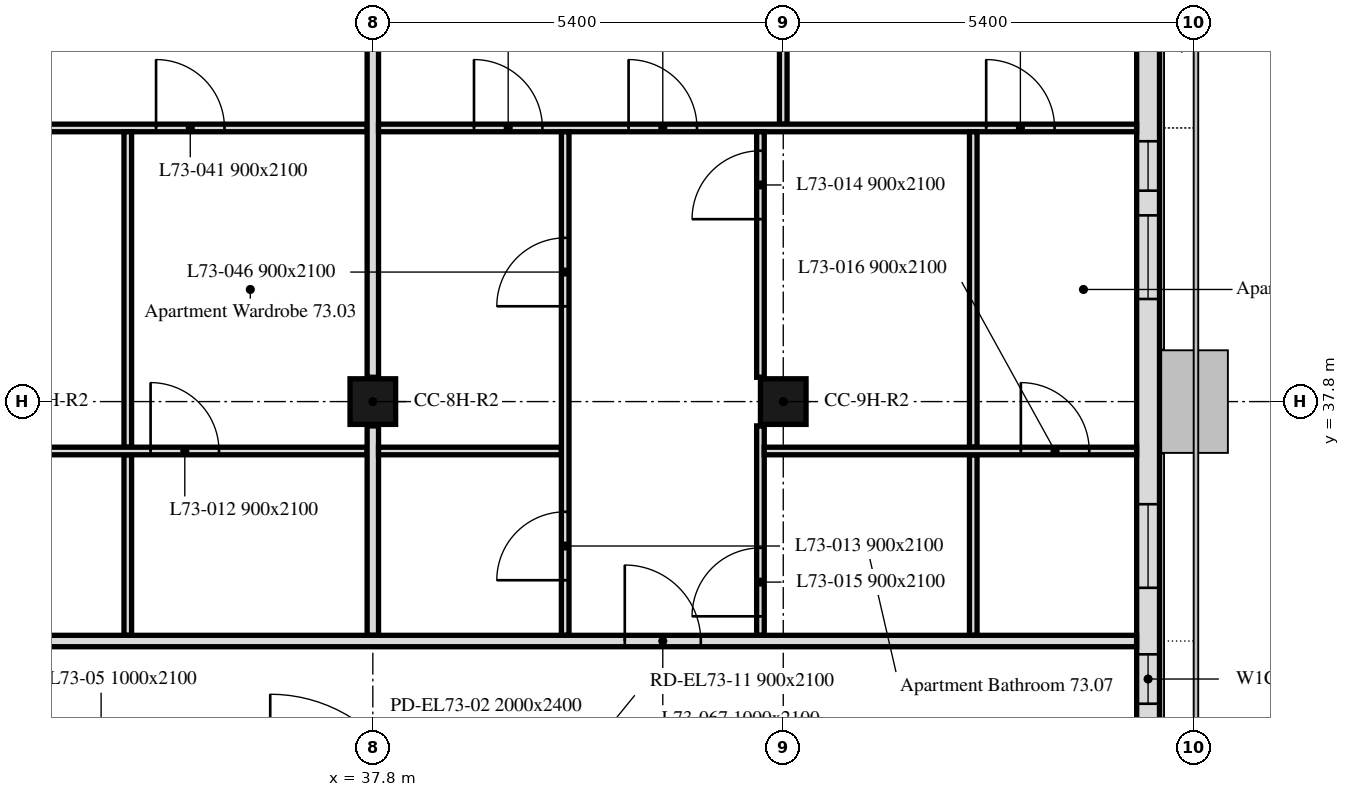
"""IFC4 building model, lengths in metres.
Left out: names, types, materials, properties, quantities, classifications, styles, units other than length and angle.
Written with IfcOpenShell. Run it as: python <this file> out.ifc"""

import sys

from ifc_helpers import new_model, si_unit, direction, frame, frame_2d, origin, origin_2d, place, context, subcontext, project, spatial, rectangle, extrude, element, fill, save


model = new_model("IFC4")
c1 = context("Model", 3, precision=1e-05, world=origin(), true_north=direction((0.0, 1.0)))
c2 = subcontext(c1, "Body", "Model", "MODEL_VIEW")
j1 = project(units=[si_unit("LENGTHUNIT", "METRE"), si_unit("PLANEANGLEUNIT", "RADIAN")], contexts=[c1])
p1 = place(None, origin())
s1 = spatial("IfcSite", under=j1, at=p1, CompositionType="ELEMENT")
p2 = place(p1, origin())
s2 = spatial("IfcBuilding", under=s1, at=p2, CompositionType="ELEMENT")
p3 = place(p2, frame((0.0, 0.0, 295.0)))
s3 = spatial("IfcBuildingStorey", under=s2, at=p3, CompositionType="ELEMENT", Elevation=295.0)
for number, where, z_axis, x_axis in (
    (1, (37.8, 37.8, 0.0), (0.0, 0.0, 1.0), (1.0, 0.0, 0.0)),
    (2, (43.2, 37.8, 0.0), (0.0, 0.0, 1.0), (1.0, 0.0, 0.0)),
):
    element("IfcColumn", number, at=place(p3, frame(where, z_axis=z_axis, x_axis=x_axis)), inside=s3, PredefinedType="COLUMN", context=c2, shape_type="SweptSolid", body=[
        extrude(rectangle(XDim=0.6, YDim=0.6, at=origin_2d()), origin(), (0.0, 0.0, 1.0), 3.0),
    ])
p4 = place(p3, frame((48.0, 10.986, 0.0), z_axis=(0.0, 0.0, 1.0), x_axis=(0.0, 1.0, 0.0)))
e3 = element("IfcWall", 3, at=p4, inside=s3, PredefinedType="SOLIDWALL", context=c2, shape_type="SweptSolid", body=[
    extrude(rectangle(XDim=32.027, YDim=0.3, at=frame_2d((16.014, 0.0))), origin(), (0.0, 0.0, 1.0), 3.0),
])
p5 = place(p4, frame((1.164, 0.0, 0.9)))
e4 = element("IfcOpeningElement", 4, at=p5, cuts=e3, PredefinedType="OPENING", context=c2, shape_type="SweptSolid", body=[
    extrude(rectangle(XDim=1.1, YDim=1.7, at=frame_2d((0.55, 0.85))), frame((0.0, 0.16, 0.0), z_axis=(0.0, -1.0, 0.0), x_axis=(1.0, 0.0, 0.0)), (0.0, 0.0, 1.0), 0.32),
])
p6 = place(p4, frame((3.114, 0.0, 0.9)))
e5 = element("IfcOpeningElement", 5, at=p6, cuts=e3, PredefinedType="OPENING", context=c2, shape_type="SweptSolid", body=[
    extrude(rectangle(XDim=1.1, YDim=1.7, at=frame_2d((0.55, 0.85))), frame((0.0, 0.16, 0.0), z_axis=(0.0, -1.0, 0.0), x_axis=(1.0, 0.0, 0.0)), (0.0, 0.0, 1.0), 0.32),
])
p7 = place(p4, frame((6.564, 0.0, 0.9)))
e6 = element("IfcOpeningElement", 6, at=p7, cuts=e3, PredefinedType="OPENING", context=c2, shape_type="SweptSolid", body=[
    extrude(rectangle(XDim=1.1, YDim=1.7, at=frame_2d((0.55, 0.85))), frame((0.0, 0.16, 0.0), z_axis=(0.0, -1.0, 0.0), x_axis=(1.0, 0.0, 0.0)), (0.0, 0.0, 1.0), 0.32),
])
p8 = place(p4, frame((8.164, 0.0, 0.9)))
e7 = element("IfcOpeningElement", 7, at=p8, cuts=e3, PredefinedType="OPENING", context=c2, shape_type="SweptSolid", body=[
    extrude(rectangle(XDim=1.1, YDim=1.7, at=frame_2d((0.55, 0.85))), frame((0.0, 0.16, 0.0), z_axis=(0.0, -1.0, 0.0), x_axis=(1.0, 0.0, 0.0)), (0.0, 0.0, 1.0), 0.32),
])
p9 = place(p4, frame((11.614, 0.0, 0.9)))
e8 = element("IfcOpeningElement", 8, at=p9, cuts=e3, PredefinedType="OPENING", context=c2, shape_type="SweptSolid", body=[
    extrude(rectangle(XDim=3.4, YDim=1.7, at=frame_2d((1.7, 0.85))), frame((0.0, 0.16, 0.0), z_axis=(0.0, -1.0, 0.0), x_axis=(1.0, 0.0, 0.0)), (0.0, 0.0, 1.0), 0.32),
])
p10 = place(p4, frame((17.364, 0.0, 0.9)))
e9 = element("IfcOpeningElement", 9, at=p10, cuts=e3, PredefinedType="OPENING", context=c2, shape_type="SweptSolid", body=[
    extrude(rectangle(XDim=1.1, YDim=1.7, at=frame_2d((0.55, 0.85))), frame((0.0, 0.16, 0.0), z_axis=(0.0, -1.0, 0.0), x_axis=(1.0, 0.0, 0.0)), (0.0, 0.0, 1.0), 0.32),
])
p11 = place(p4, frame((18.964, 0.0, 0.9)))
e10 = element("IfcOpeningElement", 10, at=p11, cuts=e3, PredefinedType="OPENING", context=c2, shape_type="SweptSolid", body=[
    extrude(rectangle(XDim=1.1, YDim=1.7, at=frame_2d((0.55, 0.85))), frame((0.0, 0.16, 0.0), z_axis=(0.0, -1.0, 0.0), x_axis=(1.0, 0.0, 0.0)), (0.0, 0.0, 1.0), 0.32),
])
p12 = place(p4, frame((22.839, 0.0, 0.9)))
e11 = element("IfcOpeningElement", 11, at=p12, cuts=e3, PredefinedType="OPENING", context=c2, shape_type="SweptSolid", body=[
    extrude(rectangle(XDim=0.65, YDim=1.7, at=frame_2d((0.325, 0.85))), frame((0.0, 0.16, 0.0), z_axis=(0.0, -1.0, 0.0), x_axis=(1.0, 0.0, 0.0)), (0.0, 0.0, 1.0), 0.32),
])
p13 = place(p4, frame((24.364, 0.0, 0.9)))
e12 = element("IfcOpeningElement", 12, at=p13, cuts=e3, PredefinedType="OPENING", context=c2, shape_type="SweptSolid", body=[
    extrude(rectangle(XDim=1.1, YDim=1.7, at=frame_2d((0.55, 0.85))), frame((0.0, 0.16, 0.0), z_axis=(0.0, -1.0, 0.0), x_axis=(1.0, 0.0, 0.0)), (0.0, 0.0, 1.0), 0.32),
])
p14 = place(p4, frame((28.164, 0.0, 0.9)))
e13 = element("IfcOpeningElement", 13, at=p14, cuts=e3, PredefinedType="OPENING", context=c2, shape_type="SweptSolid", body=[
    extrude(rectangle(XDim=1.1, YDim=1.7, at=frame_2d((0.55, 0.85))), frame((0.0, 0.16, 0.0), z_axis=(0.0, -1.0, 0.0), x_axis=(1.0, 0.0, 0.0)), (0.0, 0.0, 1.0), 0.32),
])
p15 = place(p4, frame((29.589, 0.0, 0.9)))
e14 = element("IfcOpeningElement", 14, at=p15, cuts=e3, PredefinedType="OPENING", context=c2, shape_type="SweptSolid", body=[
    extrude(rectangle(XDim=0.65, YDim=1.7, at=frame_2d((0.325, 0.85))), frame((0.0, 0.16, 0.0), z_axis=(0.0, -1.0, 0.0), x_axis=(1.0, 0.0, 0.0)), (0.0, 0.0, 1.0), 0.32),
])
p16 = place(p3, frame((32.37, 41.4, 0.0), z_axis=(0.0, 0.0, 1.0), x_axis=(1.0, 0.0, 0.0)))
e15 = element("IfcWall", 15, at=p16, inside=s3, PredefinedType="PARTITIONING", context=c2, shape_type="SweptSolid", body=[
    extrude(rectangle(XDim=5.355, YDim=0.1, at=frame_2d((2.677, 0.0))), origin(), (0.0, 0.0, 1.0), 3.0),
])
p17 = place(p16, frame((2.578, 0.0, 0.0)))
e16 = element("IfcOpeningElement", 16, at=p17, cuts=e15, PredefinedType="OPENING", context=c2, shape_type="SweptSolid", body=[
    extrude(rectangle(XDim=0.9, YDim=2.1, at=frame_2d((0.45, 1.05))), frame((0.0, 0.05, 0.0), z_axis=(0.0, -1.0, 0.0), x_axis=(1.0, 0.0, 0.0)), (0.0, 0.0, 1.0), 0.1),
])
p18 = place(p3, frame((34.576, 37.2, 0.0), z_axis=(0.0, 0.0, 1.0), x_axis=(0.0, 1.0, 0.0)))
e17 = element("IfcWall", 17, at=p18, inside=s3, PredefinedType="PARTITIONING", context=c2, shape_type="SweptSolid", body=[
    extrude(rectangle(XDim=4.15, YDim=0.1, at=frame_2d((2.075, 0.0))), origin(), (0.0, 0.0, 1.0), 2.4),
])
p19 = place(p3, frame((34.576, 34.725, 0.0), z_axis=(0.0, 0.0, 1.0), x_axis=(0.0, 1.0, 0.0)))
e18 = element("IfcWall", 18, at=p19, inside=s3, PredefinedType="PARTITIONING", context=c2, shape_type="SweptSolid", body=[
    extrude(rectangle(XDim=2.375, YDim=0.1, at=frame_2d((1.188, 0.0))), origin(), (0.0, 0.0, 1.0), 3.0),
])
p20 = place(p3, frame((32.47, 37.15, 0.0), z_axis=(0.0, 0.0, 1.0), x_axis=(1.0, 0.0, 0.0)))
e19 = element("IfcWall", 19, at=p20, inside=s3, PredefinedType="PARTITIONING", context=c2, shape_type="SweptSolid", body=[
    extrude(rectangle(XDim=5.255, YDim=0.1, at=frame_2d((2.627, 0.0))), origin(), (0.0, 0.0, 1.0), 3.0),
])
p21 = place(p20, frame((2.406, 0.0, 0.0)))
e20 = element("IfcOpeningElement", 20, at=p21, cuts=e19, PredefinedType="OPENING", context=c2, shape_type="SweptSolid", body=[
    extrude(rectangle(XDim=0.9, YDim=2.1, at=frame_2d((0.45, 1.05))), frame((0.0, 0.05, 0.0), z_axis=(0.0, -1.0, 0.0), x_axis=(1.0, 0.0, 0.0)), (0.0, 0.0, 1.0), 0.1),
])
p22 = place(p3, frame((37.8, 38.12, 0.0), z_axis=(0.0, 0.0, 1.0), x_axis=(0.0, 1.0, 0.0)))
e21 = element("IfcWall", 21, at=p22, inside=s3, PredefinedType="PARTITIONING", context=c2, shape_type="SweptSolid", body=[
    extrude(rectangle(XDim=4.76, YDim=0.15, at=frame_2d((2.38, 0.0))), origin(), (0.0, 0.0, 1.0), 2.4),
])
p23 = place(p3, frame((37.8, 34.725, 0.0), z_axis=(0.0, 0.0, 1.0), x_axis=(0.0, 1.0, 0.0)))
e22 = element("IfcWall", 22, at=p23, inside=s3, PredefinedType="PARTITIONING", context=c2, shape_type="SweptSolid", body=[
    extrude(rectangle(XDim=2.755, YDim=0.15, at=frame_2d((1.377, 0.0))), origin(), (0.0, 0.0, 1.0), 2.4),
])
p24 = place(p3, frame((43.2, 41.45, 0.0), z_axis=(0.0, 0.0, 1.0), x_axis=(0.0, 1.0, 0.0)))
e23 = element("IfcWall", 23, at=p24, inside=s3, PredefinedType="PARTITIONING", context=c2, shape_type="SweptSolid", body=[
    extrude(rectangle(XDim=6.038, YDim=0.1, at=frame_2d((3.019, 0.0))), origin(), (0.0, 0.0, 1.0), 3.0),
])
p25 = place(p24, frame((3.1, 0.0, 0.0)))
e24 = element("IfcOpeningElement", 24, at=p25, cuts=e23, PredefinedType="OPENING", context=c2, shape_type="SweptSolid", body=[
    extrude(rectangle(XDim=0.9, YDim=2.1, at=frame_2d((0.45, 1.05))), frame((0.0, 0.05, 0.0), z_axis=(0.0, -1.0, 0.0), x_axis=(1.0, 0.0, 0.0)), (0.0, 0.0, 1.0), 0.1),
])
p26 = place(p3, frame((37.875, 41.4, 0.0), z_axis=(0.0, 0.0, 1.0), x_axis=(1.0, 0.0, 0.0)))
e25 = element("IfcWall", 25, at=p26, inside=s3, PredefinedType="PARTITIONING", context=c2, shape_type="SweptSolid", body=[
    extrude(rectangle(XDim=9.974, YDim=0.1, at=frame_2d((4.987, 0.0))), origin(), (0.0, 0.0, 1.0), 3.0),
])
p27 = place(p26, frame((1.256, 0.0, 0.0)))
e26 = element("IfcOpeningElement", 26, at=p27, cuts=e25, PredefinedType="OPENING", context=c2, shape_type="SweptSolid", body=[
    extrude(rectangle(XDim=0.9, YDim=2.1, at=frame_2d((0.45, 1.05))), frame((0.0, 0.05, 0.0), z_axis=(0.0, -1.0, 0.0), x_axis=(1.0, 0.0, 0.0)), (0.0, 0.0, 1.0), 0.1),
])
p28 = place(p26, frame((7.995, 0.0, 0.0)))
e27 = element("IfcOpeningElement", 27, at=p28, cuts=e25, PredefinedType="OPENING", context=c2, shape_type="SweptSolid", body=[
    extrude(rectangle(XDim=0.9, YDim=2.1, at=frame_2d((0.45, 1.05))), frame((0.0, 0.05, 0.0), z_axis=(0.0, -1.0, 0.0), x_axis=(1.0, 0.0, 0.0)), (0.0, 0.0, 1.0), 0.1),
])
p29 = place(p26, frame((3.29, 0.0, 0.0)))
e28 = element("IfcOpeningElement", 28, at=p29, cuts=e25, PredefinedType="OPENING", context=c2, shape_type="SweptSolid", body=[
    extrude(rectangle(XDim=0.9, YDim=2.1, at=frame_2d((0.45, 1.05))), frame((0.0, 0.05, 0.0), z_axis=(0.0, -1.0, 0.0), x_axis=(1.0, 0.0, 0.0)), (0.0, 0.0, 1.0), 0.1),
])
p30 = place(p3, frame((37.875, 37.15, 0.0), z_axis=(0.0, 0.0, 1.0), x_axis=(1.0, 0.0, 0.0)))
e29 = element("IfcWall", 29, at=p30, inside=s3, PredefinedType="PARTITIONING", context=c2, shape_type="SweptSolid", body=[
    extrude(rectangle(XDim=2.406, YDim=0.1, at=frame_2d((1.203, 0.0))), origin(), (0.0, 0.0, 1.0), 3.0),
])
p31 = place(p3, frame((40.331, 34.725, 0.0), z_axis=(0.0, 0.0, 1.0), x_axis=(0.0, 1.0, 0.0)))
e30 = element("IfcWall", 30, at=p31, inside=s3, PredefinedType="PARTITIONING", context=c2, shape_type="SweptSolid", body=[
    extrude(rectangle(XDim=6.625, YDim=0.1, at=frame_2d((3.312, 0.0))), origin(), (0.0, 0.0, 1.0), 2.4),
])
p32 = place(p31, frame((0.725, 0.0, 0.0)))
e31 = element("IfcOpeningElement", 31, at=p32, cuts=e30, PredefinedType="OPENING", context=c2, shape_type="SweptSolid", body=[
    extrude(rectangle(XDim=0.9, YDim=2.1, at=frame_2d((0.45, 1.05))), frame((0.0, 0.05, 0.0), z_axis=(0.0, -1.0, 0.0), x_axis=(1.0, 0.0, 0.0)), (0.0, 0.0, 1.0), 0.1),
])
p33 = place(p31, frame((4.329, 0.0, 0.0)))
e32 = element("IfcOpeningElement", 32, at=p33, cuts=e30, PredefinedType="OPENING", context=c2, shape_type="SweptSolid", body=[
    extrude(rectangle(XDim=0.9, YDim=2.1, at=frame_2d((0.45, 1.05))), frame((0.0, 0.05, 0.0), z_axis=(0.0, -1.0, 0.0), x_axis=(1.0, 0.0, 0.0)), (0.0, 0.0, 1.0), 0.1),
])
p34 = place(p3, frame((42.9, 34.725, 0.0), z_axis=(0.0, 0.0, 1.0), x_axis=(0.0, 1.0, 0.0)))
e33 = element("IfcWall", 33, at=p34, inside=s3, PredefinedType="PARTITIONING", context=c2, shape_type="SweptSolid", body=[
    extrude(rectangle(XDim=2.755, YDim=0.1, at=frame_2d((1.377, 0.0))), origin(), (0.0, 0.0, 1.0), 3.0),
])
p35 = place(p34, frame((0.25, 0.0, 0.0)))
e34 = element("IfcOpeningElement", 34, at=p35, cuts=e33, PredefinedType="OPENING", context=c2, shape_type="SweptSolid", body=[
    extrude(rectangle(XDim=0.9, YDim=2.1, at=frame_2d((0.45, 1.05))), frame((0.0, 0.05, 0.0), z_axis=(0.0, -1.0, 0.0), x_axis=(1.0, 0.0, 0.0)), (0.0, 0.0, 1.0), 0.1),
])
p36 = place(p3, frame((42.9, 38.12, 0.0), z_axis=(0.0, 0.0, 1.0), x_axis=(0.0, 1.0, 0.0)))
e35 = element("IfcWall", 35, at=p36, inside=s3, PredefinedType="PARTITIONING", context=c2, shape_type="SweptSolid", body=[
    extrude(rectangle(XDim=3.23, YDim=0.1, at=frame_2d((1.615, 0.0))), origin(), (0.0, 0.0, 1.0), 3.0),
])
p37 = place(p36, frame((2.08, 0.0, 0.0)))
e36 = element("IfcOpeningElement", 36, at=p37, cuts=e35, PredefinedType="OPENING", context=c2, shape_type="SweptSolid", body=[
    extrude(rectangle(XDim=0.9, YDim=2.1, at=frame_2d((0.45, 1.05))), frame((0.0, 0.05, 0.0), z_axis=(0.0, -1.0, 0.0), x_axis=(1.0, 0.0, 0.0)), (0.0, 0.0, 1.0), 0.1),
])
p38 = place(p3, frame((45.7, 37.2, 0.0), z_axis=(0.0, 0.0, 1.0), x_axis=(0.0, 1.0, 0.0)))
e37 = element("IfcWall", 37, at=p38, inside=s3, PredefinedType="PARTITIONING", context=c2, shape_type="SweptSolid", body=[
    extrude(rectangle(XDim=4.15, YDim=0.1, at=frame_2d((2.075, 0.0))), origin(), (0.0, 0.0, 1.0), 2.4),
])
p39 = place(p3, frame((45.7, 34.725, 0.0), z_axis=(0.0, 0.0, 1.0), x_axis=(0.0, 1.0, 0.0)))
e38 = element("IfcWall", 38, at=p39, inside=s3, PredefinedType="PARTITIONING", context=c2, shape_type="SweptSolid", body=[
    extrude(rectangle(XDim=2.375, YDim=0.1, at=frame_2d((1.188, 0.0))), origin(), (0.0, 0.0, 1.0), 3.0),
])
p40 = place(p3, frame((42.95, 37.15, 0.0), z_axis=(0.0, 0.0, 1.0), x_axis=(1.0, 0.0, 0.0)))
e39 = element("IfcWall", 39, at=p40, inside=s3, PredefinedType="PARTITIONING", context=c2, shape_type="SweptSolid", body=[
    extrude(rectangle(XDim=4.899, YDim=0.1, at=frame_2d((2.45, 0.0))), origin(), (0.0, 0.0, 1.0), 3.0),
])
p41 = place(p40, frame((3.376, 0.0, 0.0)))
e40 = element("IfcOpeningElement", 40, at=p41, cuts=e39, PredefinedType="OPENING", context=c2, shape_type="SweptSolid", body=[
    extrude(rectangle(XDim=0.9, YDim=2.1, at=frame_2d((0.45, 1.05))), frame((0.0, 0.05, 0.0), z_axis=(0.0, -1.0, 0.0), x_axis=(1.0, 0.0, 0.0)), (0.0, 0.0, 1.0), 0.1),
])
p42 = place(p3, frame((6.151, 34.65, 0.0), z_axis=(0.0, 0.0, 1.0), x_axis=(1.0, 0.0, 0.0)))
e41 = element("IfcWall", 41, at=p42, inside=s3, PredefinedType="PARTITIONING", context=c2, shape_type="SweptSolid", body=[
    extrude(rectangle(XDim=41.698, YDim=0.15, at=frame_2d((20.849, 0.0))), origin(), (0.0, 0.0, 1.0), 2.4),
])
p43 = place(p42, frame((2.969, 0.0, 0.0)))
e42 = element("IfcOpeningElement", 42, at=p43, cuts=e41, PredefinedType="OPENING", context=c2, shape_type="SweptSolid", body=[
    extrude(rectangle(XDim=1.0, YDim=2.1, at=frame_2d((0.5, 1.05))), frame((0.0, 0.075, 0.0), z_axis=(0.0, -1.0, 0.0), x_axis=(1.0, 0.0, 0.0)), (0.0, 0.0, 1.0), 0.15),
])
p44 = place(p42, frame((12.944, 0.0, 0.0)))
e43 = element("IfcOpeningElement", 43, at=p44, cuts=e41, PredefinedType="OPENING", context=c2, shape_type="SweptSolid", body=[
    extrude(rectangle(XDim=1.0, YDim=2.1, at=frame_2d((0.5, 1.05))), frame((0.0, 0.075, 0.0), z_axis=(0.0, -1.0, 0.0), x_axis=(1.0, 0.0, 0.0)), (0.0, 0.0, 1.0), 0.15),
])
p45 = place(p42, frame((24.444, 0.0, 0.0)))
e44 = element("IfcOpeningElement", 44, at=p45, cuts=e41, PredefinedType="OPENING", context=c2, shape_type="SweptSolid", body=[
    extrude(rectangle(XDim=1.0, YDim=2.1, at=frame_2d((0.5, 1.05))), frame((0.0, 0.075, 0.0), z_axis=(0.0, -1.0, 0.0), x_axis=(1.0, 0.0, 0.0)), (0.0, 0.0, 1.0), 0.15),
])
p46 = place(p42, frame((34.964, 0.0, 0.0)))
e45 = element("IfcOpeningElement", 45, at=p46, cuts=e41, PredefinedType="OPENING", context=c2, shape_type="SweptSolid", body=[
    extrude(rectangle(XDim=1.0, YDim=2.1, at=frame_2d((0.5, 1.05))), frame((0.0, 0.075, 0.0), z_axis=(0.0, -1.0, 0.0), x_axis=(1.0, 0.0, 0.0)), (0.0, 0.0, 1.0), 0.15),
])
p47 = place(p12, origin())
e46 = element("IfcWindow", 46, at=p47, inside=s3, PartitioningType="SINGLE_PANEL", PredefinedType="WINDOW", context=c2, shape_type="SweptSolid", body=[
    extrude(rectangle(XDim=0.65, YDim=1.7, at=frame_2d((0.325, 0.85))), frame((0.0, 0.03, 0.0), z_axis=(0.0, -1.0, 0.0), x_axis=(1.0, 0.0, 0.0)), (0.0, 0.0, 1.0), 0.06),
])
fill(e11, e46)
p48 = place(p13, origin())
e47 = element("IfcWindow", 47, at=p48, inside=s3, PartitioningType="SINGLE_PANEL", PredefinedType="WINDOW", context=c2, shape_type="SweptSolid", body=[
    extrude(rectangle(XDim=1.1, YDim=1.7, at=frame_2d((0.55, 0.85))), frame((0.0, 0.03, 0.0), z_axis=(0.0, -1.0, 0.0), x_axis=(1.0, 0.0, 0.0)), (0.0, 0.0, 1.0), 0.06),
])
fill(e12, e47)
p49 = place(p14, origin())
e48 = element("IfcWindow", 48, at=p49, inside=s3, PartitioningType="SINGLE_PANEL", PredefinedType="WINDOW", context=c2, shape_type="SweptSolid", body=[
    extrude(rectangle(XDim=1.1, YDim=1.7, at=frame_2d((0.55, 0.85))), frame((0.0, 0.03, 0.0), z_axis=(0.0, -1.0, 0.0), x_axis=(1.0, 0.0, 0.0)), (0.0, 0.0, 1.0), 0.06),
])
fill(e13, e48)
p50 = place(p15, origin())
e49 = element("IfcWindow", 49, at=p50, inside=s3, PartitioningType="SINGLE_PANEL", PredefinedType="WINDOW", context=c2, shape_type="SweptSolid", body=[
    extrude(rectangle(XDim=0.65, YDim=1.7, at=frame_2d((0.325, 0.85))), frame((0.0, 0.03, 0.0), z_axis=(0.0, -1.0, 0.0), x_axis=(1.0, 0.0, 0.0)), (0.0, 0.0, 1.0), 0.06),
])
fill(e14, e49)
p51 = place(p21, origin())
e50 = element("IfcDoor", 50, at=p51, inside=s3, OperationType="SINGLE_SWING_RIGHT", PredefinedType="DOOR", context=c2, shape_type="SweptSolid", body=[
    extrude(rectangle(XDim=0.9, YDim=2.1, at=frame_2d((0.45, 1.05))), frame((0.0, 0.025, 0.0), z_axis=(0.0, -1.0, 0.0), x_axis=(1.0, 0.0, 0.0)), (0.0, 0.0, 1.0), 0.05),
])
fill(e20, e50)
p52 = place(p32, origin())
e51 = element("IfcDoor", 51, at=p52, inside=s3, OperationType="SINGLE_SWING_RIGHT", PredefinedType="DOOR", context=c2, shape_type="SweptSolid", body=[
    extrude(rectangle(XDim=0.9, YDim=2.1, at=frame_2d((0.45, 1.05))), frame((0.0, 0.025, 0.0), z_axis=(0.0, -1.0, 0.0), x_axis=(1.0, 0.0, 0.0)), (0.0, 0.0, 1.0), 0.05),
])
fill(e31, e51)
p53 = place(p37, origin())
e52 = element("IfcDoor", 52, at=p53, inside=s3, OperationType="SINGLE_SWING_LEFT", PredefinedType="DOOR", context=c2, shape_type="SweptSolid", body=[
    extrude(rectangle(XDim=0.9, YDim=2.1, at=frame_2d((0.45, 1.05))), frame((0.0, 0.025, 0.0), z_axis=(0.0, -1.0, 0.0), x_axis=(1.0, 0.0, 0.0)), (0.0, 0.0, 1.0), 0.05),
])
fill(e36, e52)
p54 = place(p35, origin())
e53 = element("IfcDoor", 53, at=p54, inside=s3, OperationType="SINGLE_SWING_LEFT", PredefinedType="DOOR", context=c2, shape_type="SweptSolid", body=[
    extrude(rectangle(XDim=0.9, YDim=2.1, at=frame_2d((0.45, 1.05))), frame((0.0, 0.025, 0.0), z_axis=(0.0, -1.0, 0.0), x_axis=(1.0, 0.0, 0.0)), (0.0, 0.0, 1.0), 0.05),
])
fill(e34, e53)
p55 = place(p41, origin())
e54 = element("IfcDoor", 54, at=p55, inside=s3, OperationType="SINGLE_SWING_LEFT", PredefinedType="DOOR", context=c2, shape_type="SweptSolid", body=[
    extrude(rectangle(XDim=0.9, YDim=2.1, at=frame_2d((0.45, 1.05))), frame((0.0, 0.025, 0.0), z_axis=(0.0, -1.0, 0.0), x_axis=(1.0, 0.0, 0.0)), (0.0, 0.0, 1.0), 0.05),
])
fill(e40, e54)
p56 = place(p17, origin())
e55 = element("IfcDoor", 55, at=p56, inside=s3, OperationType="SINGLE_SWING_LEFT", PredefinedType="DOOR", context=c2, shape_type="SweptSolid", body=[
    extrude(rectangle(XDim=0.9, YDim=2.1, at=frame_2d((0.45, 1.05))), frame((0.0, 0.025, 0.0), z_axis=(0.0, -1.0, 0.0), x_axis=(1.0, 0.0, 0.0)), (0.0, 0.0, 1.0), 0.05),
])
fill(e16, e55)
p57 = place(p27, origin())
e56 = element("IfcDoor", 56, at=p57, inside=s3, OperationType="SINGLE_SWING_LEFT", PredefinedType="DOOR", context=c2, shape_type="SweptSolid", body=[
    extrude(rectangle(XDim=0.9, YDim=2.1, at=frame_2d((0.45, 1.05))), frame((0.0, 0.025, 0.0), z_axis=(0.0, -1.0, 0.0), x_axis=(1.0, 0.0, 0.0)), (0.0, 0.0, 1.0), 0.05),
])
fill(e26, e56)
p58 = place(p28, origin())
e57 = element("IfcDoor", 57, at=p58, inside=s3, OperationType="SINGLE_SWING_RIGHT", PredefinedType="DOOR", context=c2, shape_type="SweptSolid", body=[
    extrude(rectangle(XDim=0.9, YDim=2.1, at=frame_2d((0.45, 1.05))), frame((0.0, 0.025, 0.0), z_axis=(0.0, -1.0, 0.0), x_axis=(1.0, 0.0, 0.0)), (0.0, 0.0, 1.0), 0.05),
])
fill(e27, e57)
p59 = place(p33, origin())
e58 = element("IfcDoor", 58, at=p59, inside=s3, OperationType="SINGLE_SWING_LEFT", PredefinedType="DOOR", context=c2, shape_type="SweptSolid", body=[
    extrude(rectangle(XDim=0.9, YDim=2.1, at=frame_2d((0.45, 1.05))), frame((0.0, 0.025, 0.0), z_axis=(0.0, -1.0, 0.0), x_axis=(1.0, 0.0, 0.0)), (0.0, 0.0, 1.0), 0.05),
])
fill(e32, e58)
p60 = place(p29, origin())
e59 = element("IfcDoor", 59, at=p60, inside=s3, OperationType="SINGLE_SWING_RIGHT", PredefinedType="DOOR", context=c2, shape_type="SweptSolid", body=[
    extrude(rectangle(XDim=0.9, YDim=2.1, at=frame_2d((0.45, 1.05))), frame((0.0, 0.025, 0.0), z_axis=(0.0, -1.0, 0.0), x_axis=(1.0, 0.0, 0.0)), (0.0, 0.0, 1.0), 0.05),
])
fill(e28, e59)
p61 = place(p46, origin())
e60 = element("IfcDoor", 60, at=p61, inside=s3, OperationType="SINGLE_SWING_LEFT", PredefinedType="DOOR", context=c2, shape_type="SweptSolid", body=[
    extrude(rectangle(XDim=1.0, YDim=2.1, at=frame_2d((0.5, 1.05))), frame((0.0, 0.025, 0.0), z_axis=(0.0, -1.0, 0.0), x_axis=(1.0, 0.0, 0.0)), (0.0, 0.0, 1.0), 0.05),
])
fill(e45, e60)
save(model, sys.argv[1])
